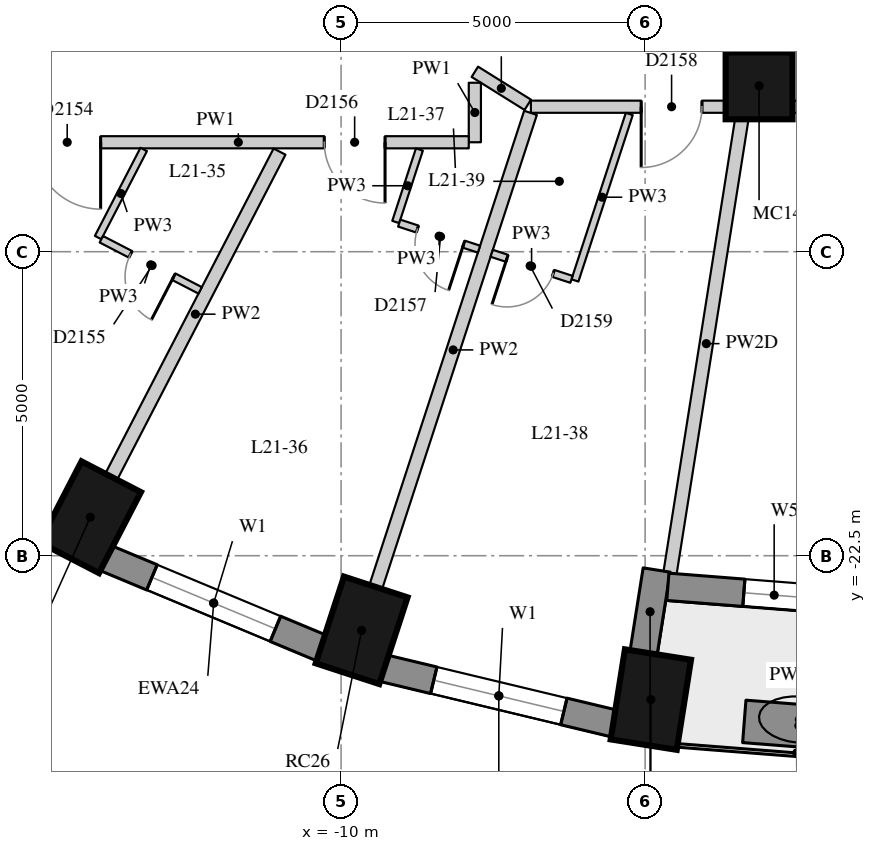
"""IFC4 building model, lengths in metres.
Left out: names, types, materials, properties, quantities, classifications, styles, units other than length and angle.
Written with IfcOpenShell. Run it as: python <this file> out.ifc"""

import sys

from ifc_helpers import new_model, si_unit, direction, frame, frame_2d, origin, origin_2d, place, context, subcontext, project, spatial, rectangle, extrude, element, fill, save


model = new_model("IFC4")
c1 = context("Model", 3, precision=1e-05, world=origin(), true_north=direction((0.0, 1.0)))
c2 = subcontext(c1, "Body", "Model", "MODEL_VIEW")
j1 = project(units=[si_unit("LENGTHUNIT", "METRE"), si_unit("PLANEANGLEUNIT", "RADIAN")], contexts=[c1])
p1 = place(None, origin())
s1 = spatial("IfcSite", under=j1, at=p1, CompositionType="ELEMENT")
p2 = place(p1, origin())
s2 = spatial("IfcBuilding", under=s1, at=p2, CompositionType="ELEMENT")
p3 = place(p2, frame((0.0, 0.0, 77.8)))
s3 = spatial("IfcBuildingStorey", under=s2, at=p3, CompositionType="ELEMENT", Elevation=77.8)
for number, where, z_axis, x_axis in (
    (1, (-14.125, -21.867, 0.0), (0.0, 0.0, 1.0), (-0.46, -0.888, 0.0)),
    (2, (-9.662, -23.727, 0.0), (0.0, 0.0, 1.0), (-0.31, -0.951, 0.0)),
    (3, (-4.906, -24.866, 0.0), (0.0, 0.0, 1.0), (-0.156, -0.988, 0.0)),
):
    element("IfcColumn", number, at=place(p3, frame(where, z_axis=z_axis, x_axis=x_axis)), inside=s3, PredefinedType="COLUMN", context=c2, shape_type="SweptSolid", body=[
        extrude(rectangle(XDim=1.5, YDim=1.1, at=origin_2d()), origin(), (0.0, 0.0, 1.0), 3.3),
    ])
p4 = place(p3, frame((-3.126, -14.772, 0.0), z_axis=(0.0, 0.0, 1.0), x_axis=(1.0, 0.0, 0.0)))
e4 = element("IfcColumn", 4, at=p4, inside=s3, PredefinedType="COLUMN", context=c2, shape_type="SweptSolid", body=[
    extrude(rectangle(XDim=1.1, YDim=1.1, at=origin_2d()), origin(), (0.0, 0.0, 1.0), 3.3),
])
p5 = place(p3, frame((-18.023, -20.044, 0.0), z_axis=(0.0, 0.0, 1.0), x_axis=(0.847635480093, -0.530579016629, 0.0)))
e5 = element("IfcWall", 5, at=p5, inside=s3, PredefinedType="SOLIDWALL", context=c2, shape_type="SweptSolid", body=[
    extrude(rectangle(XDim=3.782, YDim=0.45, at=frame_2d((1.891, 0.0))), origin(), (0.0, 0.0, 1.0), 3.02),
])
p6 = place(p5, frame((0.791, 0.0, 0.4)))
e6 = element("IfcOpeningElement", 6, at=p6, cuts=e5, PredefinedType="OPENING", context=c2, shape_type="SweptSolid", body=[
    extrude(rectangle(XDim=2.2, YDim=1.75, at=frame_2d((1.1, 0.875))), frame((0.0, 0.235, 0.0), z_axis=(0.0, -1.0, 0.0), x_axis=(1.0, 0.0, 0.0)), (0.0, 0.0, 1.0), 0.47),
])
p7 = place(p3, frame((-13.875, -22.537, 0.0), z_axis=(0.0, 0.0, 1.0), x_axis=(0.923031964282, -0.384723267966, 0.0)))
e7 = element("IfcWall", 7, at=p7, inside=s3, PredefinedType="SOLIDWALL", context=c2, shape_type="SweptSolid", body=[
    extrude(rectangle(XDim=3.856, YDim=0.45, at=frame_2d((1.928, 0.0))), origin(), (0.0, 0.0, 1.0), 3.02),
])
p8 = place(p7, frame((0.828, 0.0, 0.4)))
e8 = element("IfcOpeningElement", 8, at=p8, cuts=e7, PredefinedType="OPENING", context=c2, shape_type="SweptSolid", body=[
    extrude(rectangle(XDim=2.2, YDim=1.75, at=frame_2d((1.1, 0.875))), frame((0.0, 0.235, 0.0), z_axis=(0.0, -1.0, 0.0), x_axis=(1.0, 0.0, 0.0)), (0.0, 0.0, 1.0), 0.47),
])
p9 = place(p3, frame((-9.308, -24.35, 0.0), z_axis=(0.0, 0.0, 1.0), x_axis=(0.972496561493, -0.232917233979, 0.0)))
e9 = element("IfcWall", 9, at=p9, inside=s3, PredefinedType="SOLIDWALL", context=c2, shape_type="SweptSolid", body=[
    extrude(rectangle(XDim=3.911, YDim=0.45, at=frame_2d((1.956, 0.0))), origin(), (0.0, 0.0, 1.0), 3.02),
])
p10 = place(p9, frame((0.855, 0.0, 0.4)))
e10 = element("IfcOpeningElement", 10, at=p10, cuts=e9, PredefinedType="OPENING", context=c2, shape_type="SweptSolid", body=[
    extrude(rectangle(XDim=2.2, YDim=1.75, at=frame_2d((1.1, 0.875))), frame((0.0, 0.235, 0.0), z_axis=(0.0, -1.0, 0.0), x_axis=(1.0, 0.0, 0.0)), (0.0, 0.0, 1.0), 0.47),
])
p11 = place(p3, frame((-5.027, -24.108, 0.0), z_axis=(0.0, 0.0, 1.0), x_axis=(0.156133927791, 0.98773589415, 0.0)))
e11 = element("IfcWall", 11, at=p11, inside=s3, PredefinedType="SOLIDWALL", context=c2, shape_type="SweptSolid", body=[
    extrude(rectangle(XDim=1.39, YDim=0.45, at=frame_2d((0.695, 0.0))), origin(), (0.0, 0.0, 1.0), 2.47),
])
p12 = place(p3, frame((-4.626, -23.011, 0.0), z_axis=(0.0, 0.0, 1.0), x_axis=(0.996937095772, -0.078207589615, 0.0)))
e12 = element("IfcWall", 12, at=p12, inside=s3, PredefinedType="SOLIDWALL", context=c2, shape_type="SweptSolid", body=[
    extrude(rectangle(XDim=4.657, YDim=0.45, at=frame_2d((2.329, 0.0))), origin(), (0.0, 0.0, 1.0), 3.02),
])
p13 = place(p12, frame((1.254, 0.0, 0.4)))
e13 = element("IfcOpeningElement", 13, at=p13, cuts=e12, PredefinedType="OPENING", context=c2, shape_type="SweptSolid", body=[
    extrude(rectangle(XDim=1.0, YDim=1.75, at=frame_2d((0.5, 0.875))), frame((0.0, 0.235, 0.0), z_axis=(0.0, -1.0, 0.0), x_axis=(1.0, 0.0, 0.0)), (0.0, 0.0, 1.0), 0.47),
])
p14 = place(p12, frame((2.404, 0.0, 0.0)))
e14 = element("IfcOpeningElement", 14, at=p14, cuts=e12, PredefinedType="OPENING", context=c2, shape_type="SweptSolid", body=[
    extrude(rectangle(XDim=1.0, YDim=2.15, at=frame_2d((0.5, 1.075))), frame((0.0, 0.235, 0.0), z_axis=(0.0, -1.0, 0.0), x_axis=(1.0, 0.0, 0.0)), (0.0, 0.0, 1.0), 0.47),
])
p15 = place(p3, frame((-3.369, -25.225, 0.0), z_axis=(0.0, 0.0, 1.0), x_axis=(0.996965267018, -0.077847648384, 0.0)))
e15 = element("IfcWall", 15, at=p15, inside=s3, PredefinedType="USERDEFINED", context=c2, shape_type="SweptSolid", body=[
    extrude(rectangle(XDim=1.8, YDim=0.7, at=frame_2d((0.9, 0.0))), origin(), (0.0, 0.0, 1.0), 0.75),
])
p16 = place(p3, frame((6.778, -15.115, 0.0), z_axis=(0.0, 0.0, 1.0), x_axis=(-1.0, 0.0, 0.0)))
e16 = element("IfcWall", 16, at=p16, inside=s3, PredefinedType="PARTITIONING", context=c2, shape_type="SweptSolid", body=[
    extrude(rectangle(XDim=13.657, YDim=0.2, at=frame_2d((6.828, 0.0))), origin(), (0.0, 0.0, 1.0), 2.42),
])
p17 = place(p16, frame((10.843, 0.0, 0.0)))
e17 = element("IfcOpeningElement", 17, at=p17, cuts=e16, PredefinedType="OPENING", context=c2, shape_type="SweptSolid", body=[
    extrude(rectangle(XDim=1.0, YDim=2.1, at=frame_2d((0.5, 1.05))), frame((0.0, 0.11, 0.0), z_axis=(0.0, -1.0, 0.0), x_axis=(1.0, 0.0, 0.0)), (0.0, 0.0, 1.0), 0.22),
])
p18 = place(p16, frame((4.505, 0.0, 0.0)))
e18 = element("IfcOpeningElement", 18, at=p18, cuts=e16, PredefinedType="OPENING", context=c2, shape_type="SweptSolid", body=[
    extrude(rectangle(XDim=1.1, YDim=2.1, at=frame_2d((0.55, 1.05))), frame((0.0, 0.11, 0.0), z_axis=(0.0, -1.0, 0.0), x_axis=(1.0, 0.0, 0.0)), (0.0, 0.0, 1.0), 0.22),
])
p19 = place(p3, frame((-6.93, -15.084, 0.0), z_axis=(0.0, 0.0, 1.0), x_axis=(-0.848439230109, 0.529292804421, 0.0)))
e19 = element("IfcWall", 19, at=p19, inside=s3, PredefinedType="PARTITIONING", context=c2, shape_type="SweptSolid", body=[
    extrude(rectangle(XDim=1.026, YDim=0.2, at=frame_2d((0.513, 0.0))), origin(), (0.0, 0.0, 1.0), 3.02),
])
p20 = place(p3, frame((-7.8, -14.721, 0.0), z_axis=(0.0, 0.0, 1.0), x_axis=(0.0, -1.0, 0.0)))
e20 = element("IfcWall", 20, at=p20, inside=s3, PredefinedType="PARTITIONING", context=c2, shape_type="SweptSolid", body=[
    extrude(rectangle(XDim=0.979, YDim=0.2, at=frame_2d((0.489, 0.0))), origin(), (0.0, 0.0, 1.0), 3.02),
])
p21 = place(p3, frame((-7.9, -15.7, 0.0), z_axis=(0.0, 0.0, 1.0), x_axis=(-1.0, 0.0, 0.0)))
e21 = element("IfcWall", 21, at=p21, inside=s3, PredefinedType="PARTITIONING", context=c2, shape_type="SweptSolid", body=[
    extrude(rectangle(XDim=7.58, YDim=0.2, at=frame_2d((3.79, 0.0))), origin(), (0.0, 0.0, 1.0), 3.02),
])
p22 = place(p21, frame((6.054, 0.0, 0.0)))
e22 = element("IfcOpeningElement", 22, at=p22, cuts=e21, PredefinedType="OPENING", context=c2, shape_type="SweptSolid", body=[
    extrude(rectangle(XDim=1.1, YDim=2.1, at=frame_2d((0.55, 1.05))), frame((0.0, 0.11, 0.0), z_axis=(0.0, -1.0, 0.0), x_axis=(1.0, 0.0, 0.0)), (0.0, 0.0, 1.0), 0.22),
])
p23 = place(p21, frame((1.377, 0.0, 0.0)))
e23 = element("IfcOpeningElement", 23, at=p23, cuts=e21, PredefinedType="OPENING", context=c2, shape_type="SweptSolid", body=[
    extrude(rectangle(XDim=1.0, YDim=2.1, at=frame_2d((0.5, 1.05))), frame((0.0, 0.11, 0.0), z_axis=(0.0, -1.0, 0.0), x_axis=(1.0, 0.0, 0.0)), (0.0, 0.0, 1.0), 0.22),
])
p24 = place(p3, frame((-13.78, -21.201, 0.0), z_axis=(0.0, 0.0, 1.0), x_axis=(0.459689820266, 0.888079539875, 0.0)))
e24 = element("IfcWall", 24, at=p24, inside=s3, PredefinedType="PARTITIONING", context=c2, shape_type="SweptSolid", body=[
    extrude(rectangle(XDim=6.021, YDim=0.22, at=frame_2d((3.011, 0.0))), origin(), (0.0, 0.0, 1.0), 3.02),
])
p25 = place(p3, frame((-9.429, -23.014, 0.0), z_axis=(0.0, 0.0, 1.0), x_axis=(0.310248090606, 0.950655627594, 0.0)))
e25 = element("IfcWall", 25, at=p25, inside=s3, PredefinedType="PARTITIONING", context=c2, shape_type="SweptSolid", body=[
    extrude(rectangle(XDim=8.203, YDim=0.22, at=frame_2d((4.102, 0.0))), origin(), (0.0, 0.0, 1.0), 3.02),
])
p26 = place(p3, frame((-4.591, -22.789, 0.0), z_axis=(0.0, 0.0, 1.0), x_axis=(0.156151107863, 0.987733178299, 0.0)))
e26 = element("IfcWall", 26, at=p26, inside=s3, PredefinedType="PARTITIONING", context=c2, shape_type="SweptSolid", body=[
    extrude(rectangle(XDim=7.647, YDim=0.22, at=frame_2d((3.823, 0.0))), origin(), (0.0, 0.0, 1.0), 2.47),
])
p27 = place(p3, frame((-13.246, -15.818, 0.0), z_axis=(0.0, 0.0, 1.0), x_axis=(-0.459675202516, -0.888087106196, 0.0)))
e27 = element("IfcWall", 27, at=p27, inside=s3, PredefinedType="PARTITIONING", context=c2, shape_type="SweptSolid", body=[
    extrude(rectangle(XDim=1.632, YDim=0.12, at=frame_2d((0.816, 0.0))), origin(), (0.0, 0.0, 1.0), 3.02),
])
p28 = place(p3, frame((-8.712, -15.819, 0.0), z_axis=(0.0, 0.0, 1.0), x_axis=(-0.310322794195, -0.950631244702, 0.0)))
e28 = element("IfcWall", 28, at=p28, inside=s3, PredefinedType="PARTITIONING", context=c2, shape_type="SweptSolid", body=[
    extrude(rectangle(XDim=1.254, YDim=0.12, at=frame_2d((0.627, 0.0))), origin(), (0.0, 0.0, 1.0), 3.02),
])
p29 = place(p3, frame((-5.26, -15.235, 0.0), z_axis=(0.0, 0.0, 1.0), x_axis=(-0.310220453498, -0.950664646567, 0.0)))
e29 = element("IfcWall", 29, at=p29, inside=s3, PredefinedType="PARTITIONING", context=c2, shape_type="SweptSolid", body=[
    extrude(rectangle(XDim=2.88, YDim=0.12, at=frame_2d((1.44, 0.0))), origin(), (0.0, 0.0, 1.0), 3.02),
])
p30 = place(p3, frame((-13.943, -17.295, 0.0), z_axis=(0.0, 0.0, 1.0), x_axis=(0.888151937069, -0.459549928387, 0.0)))
e30 = element("IfcWall", 30, at=p30, inside=s3, PredefinedType="PARTITIONING", context=c2, shape_type="SweptSolid", body=[
    extrude(rectangle(XDim=1.83, YDim=0.12, at=frame_2d((0.915, 0.0))), origin(), (0.0, 0.0, 1.0), 3.02),
])
p31 = place(p30, frame((0.54, 0.0, 0.0)))
e31 = element("IfcOpeningElement", 31, at=p31, cuts=e30, PredefinedType="OPENING", context=c2, shape_type="SweptSolid", body=[
    extrude(rectangle(XDim=0.8, YDim=2.1, at=frame_2d((0.4, 1.05))), frame((0.0, 0.07, 0.0), z_axis=(0.0, -1.0, 0.0), x_axis=(1.0, 0.0, 0.0)), (0.0, 0.0, 1.0), 0.14),
])
p32 = place(p3, frame((-9.044, -17.03, 0.0), z_axis=(0.0, 0.0, 1.0), x_axis=(0.950645927723, -0.31027781117, 0.0)))
e32 = element("IfcWall", 32, at=p32, inside=s3, PredefinedType="PARTITIONING", context=c2, shape_type="SweptSolid", body=[
    extrude(rectangle(XDim=1.38, YDim=0.12, at=frame_2d((0.69, 0.0))), origin(), (0.0, 0.0, 1.0), 3.02),
])
p33 = place(p32, frame((0.315, 0.0, 0.0)))
e33 = element("IfcOpeningElement", 33, at=p33, cuts=e32, PredefinedType="OPENING", context=c2, shape_type="SweptSolid", body=[
    extrude(rectangle(XDim=0.8, YDim=2.1, at=frame_2d((0.4, 1.05))), frame((0.0, 0.07, 0.0), z_axis=(0.0, -1.0, 0.0), x_axis=(1.0, 0.0, 0.0)), (0.0, 0.0, 1.0), 0.14),
])
p34 = place(p3, frame((-6.211, -17.955, 0.0), z_axis=(0.0, 0.0, 1.0), x_axis=(-0.950645927723, 0.31027781117, 0.0)))
e34 = element("IfcWall", 34, at=p34, inside=s3, PredefinedType="PARTITIONING", context=c2, shape_type="SweptSolid", body=[
    extrude(rectangle(XDim=1.38, YDim=0.12, at=frame_2d((0.69, 0.0))), origin(), (0.0, 0.0, 1.0), 3.02),
])
p35 = place(p34, frame((0.315, 0.0, 0.0)))
e35 = element("IfcOpeningElement", 35, at=p35, cuts=e34, PredefinedType="OPENING", context=c2, shape_type="SweptSolid", body=[
    extrude(rectangle(XDim=0.8, YDim=2.1, at=frame_2d((0.4, 1.05))), frame((0.0, 0.07, 0.0), z_axis=(0.0, -1.0, 0.0), x_axis=(1.0, 0.0, 0.0)), (0.0, 0.0, 1.0), 0.14),
])
p36 = place(p8, origin())
e36 = element("IfcWindow", 36, at=p36, inside=s3, PartitioningType="SINGLE_PANEL", PredefinedType="WINDOW", context=c2, shape_type="SweptSolid", body=[
    extrude(rectangle(XDim=2.2, YDim=1.75, at=frame_2d((1.1, 0.875))), frame((0.0, 0.035, 0.0), z_axis=(0.0, -1.0, 0.0), x_axis=(1.0, 0.0, 0.0)), (0.0, 0.0, 1.0), 0.06),
])
fill(e8, e36)
p37 = place(p10, origin())
e37 = element("IfcWindow", 37, at=p37, inside=s3, PartitioningType="SINGLE_PANEL", PredefinedType="WINDOW", context=c2, shape_type="SweptSolid", body=[
    extrude(rectangle(XDim=2.2, YDim=1.75, at=frame_2d((1.1, 0.875))), frame((0.0, 0.035, 0.0), z_axis=(0.0, -1.0, 0.0), x_axis=(1.0, 0.0, 0.0)), (0.0, 0.0, 1.0), 0.06),
])
fill(e10, e37)
p38 = place(p13, origin())
e38 = element("IfcWindow", 38, at=p38, inside=s3, PartitioningType="SINGLE_PANEL", PredefinedType="WINDOW", context=c2, shape_type="SweptSolid", body=[
    extrude(rectangle(XDim=1.0, YDim=1.75, at=frame_2d((0.5, 0.875))), frame((0.0, 0.035, 0.0), z_axis=(0.0, -1.0, 0.0), x_axis=(1.0, 0.0, 0.0)), (0.0, 0.0, 1.0), 0.06),
])
fill(e13, e38)
p39 = place(p22, origin())
e39 = element("IfcDoor", 39, at=p39, inside=s3, OperationType="SINGLE_SWING_LEFT", PredefinedType="DOOR", context=c2, shape_type="SweptSolid", body=[
    extrude(rectangle(XDim=1.1, YDim=2.1, at=frame_2d((0.55, 1.05))), frame((0.0, 0.025, 0.0), z_axis=(0.0, -1.0, 0.0), x_axis=(1.0, 0.0, 0.0)), (0.0, 0.0, 1.0), 0.05),
])
fill(e22, e39)
p40 = place(p31, origin())
e40 = element("IfcDoor", 40, at=p40, inside=s3, OperationType="SINGLE_SWING_LEFT", PredefinedType="DOOR", context=c2, shape_type="SweptSolid", body=[
    extrude(rectangle(XDim=0.8, YDim=2.1, at=frame_2d((0.4, 1.05))), frame((0.0, 0.025, 0.0), z_axis=(0.0, -1.0, 0.0), x_axis=(1.0, 0.0, 0.0)), (0.0, 0.0, 1.0), 0.05),
])
fill(e31, e40)
p41 = place(p23, origin())
e41 = element("IfcDoor", 41, at=p41, inside=s3, OperationType="SINGLE_SWING_LEFT", PredefinedType="DOOR", context=c2, shape_type="SweptSolid", body=[
    extrude(rectangle(XDim=1.0, YDim=2.1, at=frame_2d((0.5, 1.05))), frame((0.0, 0.025, 0.0), z_axis=(0.0, -1.0, 0.0), x_axis=(1.0, 0.0, 0.0)), (0.0, 0.0, 1.0), 0.05),
])
fill(e23, e41)
p42 = place(p33, origin())
e42 = element("IfcDoor", 42, at=p42, inside=s3, OperationType="SINGLE_SWING_LEFT", PredefinedType="DOOR", context=c2, shape_type="SweptSolid", body=[
    extrude(rectangle(XDim=0.8, YDim=2.1, at=frame_2d((0.4, 1.05))), frame((0.0, 0.025, 0.0), z_axis=(0.0, -1.0, 0.0), x_axis=(1.0, 0.0, 0.0)), (0.0, 0.0, 1.0), 0.05),
])
fill(e33, e42)
p43 = place(p17, origin())
e43 = element("IfcDoor", 43, at=p43, inside=s3, OperationType="SINGLE_SWING_RIGHT", PredefinedType="DOOR", context=c2, shape_type="SweptSolid", body=[
    extrude(rectangle(XDim=1.0, YDim=2.1, at=frame_2d((0.5, 1.05))), frame((0.0, 0.025, 0.0), z_axis=(0.0, -1.0, 0.0), x_axis=(1.0, 0.0, 0.0)), (0.0, 0.0, 1.0), 0.05),
])
fill(e17, e43)
p44 = place(p35, origin())
e44 = element("IfcDoor", 44, at=p44, inside=s3, OperationType="SINGLE_SWING_RIGHT", PredefinedType="DOOR", context=c2, shape_type="SweptSolid", body=[
    extrude(rectangle(XDim=0.8, YDim=2.1, at=frame_2d((0.4, 1.05))), frame((0.0, 0.025, 0.0), z_axis=(0.0, -1.0, 0.0), x_axis=(1.0, 0.0, 0.0)), (0.0, 0.0, 1.0), 0.05),
])
fill(e35, e44)
save(model, sys.argv[1])
